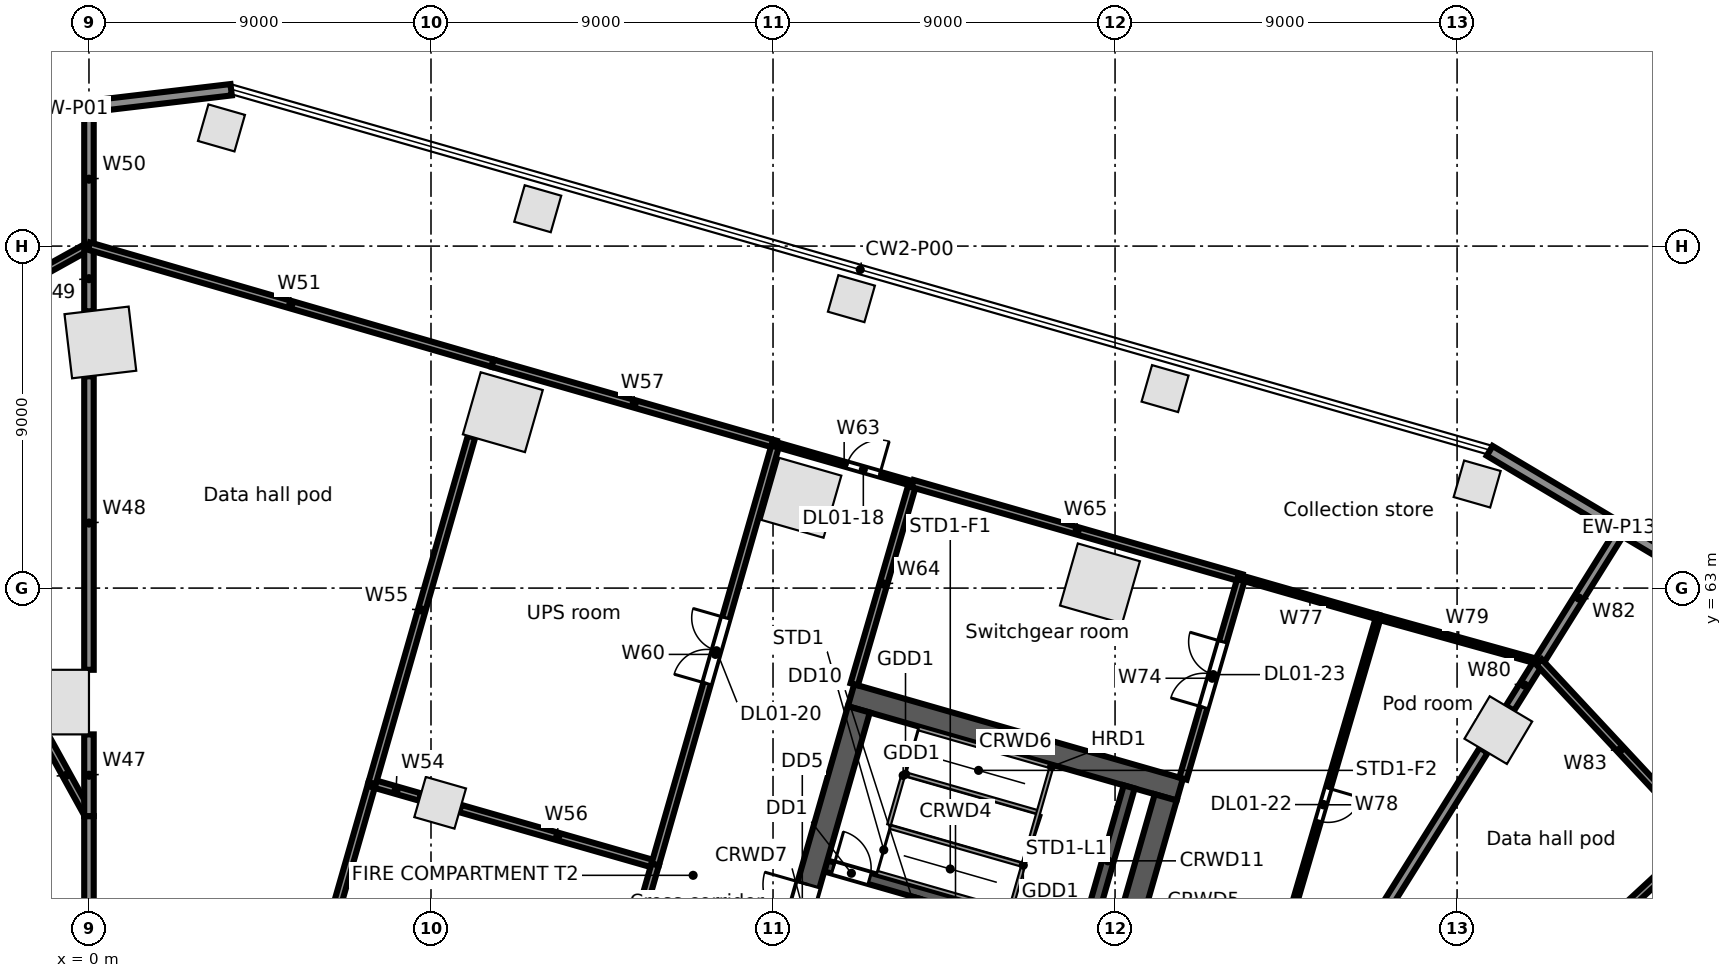
"""IFC4 building model, lengths in metres.
Left out: names, types, materials, properties, quantities, classifications, styles, units other than length and angle.
Written with IfcOpenShell. Run it as: python <this file> out.ifc"""

import sys

from ifc_helpers import new_model, si_unit, direction, frame, frame_2d, origin, origin_2d, place, context, subcontext, project, spatial, rectangle, extrude, element, fill, save


model = new_model("IFC4")
c1 = context("Model", 3, precision=1e-05, world=origin(), true_north=direction((0.0, 1.0)))
c2 = subcontext(c1, "Body", "Model", "MODEL_VIEW")
j1 = project(units=[si_unit("LENGTHUNIT", "METRE"), si_unit("PLANEANGLEUNIT", "RADIAN")], contexts=[c1])
p1 = place(None, origin())
s1 = spatial("IfcSite", under=j1, at=p1, CompositionType="ELEMENT")
p2 = place(p1, origin())
s2 = spatial("IfcBuilding", under=s1, at=p2, CompositionType="ELEMENT")
p3 = place(p2, frame((0.0, 0.0, 6.5)))
s3 = spatial("IfcBuildingStorey", under=s2, at=p3, CompositionType="ELEMENT", Elevation=6.5)
p4 = place(p3, frame((37.085, 59.262, 0.0), z_axis=(0.0, 0.0, 1.0), x_axis=(-0.859406411501, 0.511293086077, 0.0)))
e1 = element("IfcColumn", 1, at=p4, inside=s3, PredefinedType="COLUMN", context=c2, shape_type="SweptSolid", body=[
    extrude(rectangle(XDim=1.3, YDim=1.3, at=origin_2d()), origin(), (0.0, 0.0, 1.0), 5.0),
])
for number, where, z_axis, x_axis in (
    (2, (26.603, 63.124, 0.0), (0.0, 0.0, 1.0), (-0.961, 0.276, 0.0)),
    (3, (18.746, 65.376, 0.0), (0.0, 0.0, 1.0), (-0.961, 0.276, 0.0)),
    (4, (10.89, 67.629, 0.0), (0.0, 0.0, 1.0), (-0.961, 0.276, 0.0)),
    (5, (0.3, 69.464, 0.0), (0.0, 0.0, 1.0), (-0.993, -0.118, 0.0)),
    (6, (-0.85, 60.0, 0.0), (0.0, 0.0, 1.0), (0.0, 1.0, 0.0)),
):
    element("IfcColumn", number, at=place(p3, frame(where, z_axis=z_axis, x_axis=x_axis)), inside=s3, PredefinedType="COLUMN", context=c2, shape_type="SweptSolid", body=[
        extrude(rectangle(XDim=1.7, YDim=1.7, at=origin_2d()), origin(), (0.0, 0.0, 1.0), 5.0),
    ])
for number, where, z_axis, x_axis in (
    (7, (36.528, 65.739, 0.0), (0.0, 0.0, 1.0), (-0.961, 0.276, 0.0)),
    (8, (28.316, 68.25, 0.0), (0.0, 0.0, 1.0), (-0.961, 0.276, 0.0)),
    (9, (20.062, 70.616, 0.0), (0.0, 0.0, 1.0), (-0.961, 0.276, 0.0)),
    (10, (11.809, 72.983, 0.0), (0.0, 0.0, 1.0), (-0.961, 0.276, 0.0)),
    (11, (3.486, 75.11, 0.0), (0.0, 0.0, 1.0), (-0.961, 0.276, 0.0)),
):
    element("IfcColumn", number, at=place(p3, frame(where, z_axis=z_axis, x_axis=x_axis)), inside=s3, PredefinedType="COLUMN", context=c2, shape_type="SweptSolid", body=[
        extrude(rectangle(XDim=1.0, YDim=1.0, at=origin_2d()), origin(), (0.0, 0.0, 1.0), 5.0),
    ])
p5 = place(p3, frame((9.241, 57.35, 0.0), z_axis=(0.0, 0.0, 1.0), x_axis=(0.961261695938, -0.275637355817, 0.0)))
e12 = element("IfcColumn", 12, at=p5, inside=s3, PredefinedType="COLUMN", context=c2, shape_type="SweptSolid", body=[
    extrude(rectangle(XDim=1.1, YDim=1.1, at=origin_2d()), origin(), (0.0, 0.0, 1.0), 5.0),
])
p6 = place(p3, frame((-4.663, 75.12, 0.0), z_axis=(0.0, 0.0, 1.0), x_axis=(0.993069631717, 0.11752747152, 0.0)))
e13 = element("IfcWall", 13, at=p6, inside=s3, PredefinedType="STANDARD", context=c2, shape_type="SweptSolid", body=[
    extrude(rectangle(XDim=8.463, YDim=0.3, at=frame_2d((4.231, 0.0))), origin(), (0.0, 0.0, 1.0), 4.65),
])
p7 = place(p3, frame((36.858, 66.612, 0.0), z_axis=(0.0, 0.0, 1.0), x_axis=(0.85940790562, -0.51129057468, 0.0)))
e14 = element("IfcWall", 14, at=p7, inside=s3, PredefinedType="STANDARD", context=c2, shape_type="SweptSolid", body=[
    extrude(rectangle(XDim=7.906, YDim=0.3, at=frame_2d((3.953, 0.0))), origin(), (0.0, 0.0, 1.0), 4.65),
])
p8 = place(p3, frame((19.389, 55.689, 0.0), z_axis=(0.0, 0.0, 1.0), x_axis=(0.961261397636, -0.275638396117, 0.0)))
e15 = element("IfcWall", 15, at=p8, inside=s3, PredefinedType="SOLIDWALL", context=c2, shape_type="SweptSolid", body=[
    extrude(rectangle(XDim=7.1, YDim=0.3, at=frame_2d((3.55, 0.0))), origin(), (0.0, 0.0, 1.0), 4.65),
])
p9 = place(p8, frame((0.2, 0.0, 0.0)))
e16 = element("IfcOpeningElement", 16, at=p9, cuts=e15, PredefinedType="OPENING", context=c2, shape_type="SweptSolid", body=[
    extrude(rectangle(XDim=1.0, YDim=2.1, at=frame_2d((0.5, 1.05))), frame((0.0, 0.16, 0.0), z_axis=(0.0, -1.0, 0.0), x_axis=(1.0, 0.0, 0.0)), (0.0, 0.0, 1.0), 0.32),
])
p10 = place(p3, frame((20.053, 60.18, 0.0), z_axis=(0.0, 0.0, 1.0), x_axis=(0.96126248289, -0.275634611374, 0.0)))
e17 = element("IfcWall", 17, at=p10, inside=s3, PredefinedType="SOLIDWALL", context=c2, shape_type="SweptSolid", body=[
    extrude(rectangle(XDim=9.0, YDim=0.6, at=frame_2d((4.5, 0.0))), origin(), (0.0, 0.0, 1.0), 4.65),
])
p11 = place(p3, frame((17.282, 49.427, 0.0), z_axis=(0.0, 0.0, 1.0), x_axis=(0.275631631629, 0.961263337304, 0.0)))
e18 = element("IfcWall", 18, at=p11, inside=s3, PredefinedType="SOLIDWALL", context=c2, shape_type="SweptSolid", body=[
    extrude(rectangle(XDim=10.8, YDim=0.6, at=frame_2d((5.4, 0.0))), origin(), (0.0, 0.0, 1.0), 4.65),
])
p12 = place(p11, frame((4.8, 0.0, 0.0)))
e19 = element("IfcOpeningElement", 19, at=p12, cuts=e18, PredefinedType="OPENING", context=c2, shape_type="SweptSolid", body=[
    extrude(rectangle(XDim=1.2, YDim=2.1, at=frame_2d((0.6, 1.05))), frame((0.0, 0.31, 0.0), z_axis=(0.0, -1.0, 0.0), x_axis=(1.0, 0.0, 0.0)), (0.0, 0.0, 1.0), 0.62),
])
p13 = place(p3, frame((21.172, 52.837, 0.0), z_axis=(0.0, 0.0, 1.0), x_axis=(0.275657676022, 0.961255868981, 0.0)))
e20 = element("IfcWall", 20, at=p13, inside=s3, PredefinedType="PARTITIONING", context=c2, shape_type="SweptSolid", body=[
    extrude(rectangle(XDim=2.1, YDim=0.2, at=frame_2d((1.05, 0.0))), origin(), (0.0, 0.0, 1.0), 4.65),
])
p14 = place(p13, frame((0.55, 0.0, 0.0)))
e21 = element("IfcOpeningElement", 21, at=p14, cuts=e20, PredefinedType="OPENING", context=c2, shape_type="SweptSolid", body=[
    extrude(rectangle(XDim=1.0, YDim=2.1, at=frame_2d((0.5, 1.05))), frame((0.0, 0.11, 0.0), z_axis=(0.0, -1.0, 0.0), x_axis=(1.0, 0.0, 0.0)), (0.0, 0.0, 1.0), 0.22),
])
p15 = place(p3, frame((26.256, 53.876, 0.0), z_axis=(0.0, 0.0, 1.0), x_axis=(0.275612739511, 0.961268754209, 0.0)))
e22 = element("IfcWall", 22, at=p15, inside=s3, PredefinedType="SOLIDWALL", context=c2, shape_type="SweptSolid", body=[
    extrude(rectangle(XDim=4.05, YDim=0.3, at=frame_2d((2.025, 0.0))), origin(), (0.0, 0.0, 1.0), 4.65),
])
p16 = place(p3, frame((25.356, 47.112, 0.0), z_axis=(0.0, 0.0, 1.0), x_axis=(0.275631631629, 0.961263337304, 0.0)))
e23 = element("IfcWall", 23, at=p16, inside=s3, PredefinedType="SOLIDWALL", context=c2, shape_type="SweptSolid", body=[
    extrude(rectangle(XDim=10.8, YDim=0.6, at=frame_2d((5.4, 0.0))), origin(), (0.0, 0.0, 1.0), 4.65),
])
p17 = place(p16, frame((4.8, 0.0, 0.0)))
e24 = element("IfcOpeningElement", 24, at=p17, cuts=e23, PredefinedType="OPENING", context=c2, shape_type="SweptSolid", body=[
    extrude(rectangle(XDim=1.2, YDim=2.1, at=frame_2d((0.6, 1.05))), frame((0.0, 0.31, 0.0), z_axis=(0.0, -1.0, 0.0), x_axis=(1.0, 0.0, 0.0)), (0.0, 0.0, 1.0), 0.62),
])
p18 = place(p3, frame((-6.337, 68.478, 0.0), z_axis=(0.0, 0.0, 1.0), x_axis=(0.87407148623, 0.485797320864, 0.0)))
e25 = element("IfcWall", 25, at=p18, inside=s3, PredefinedType="PARTITIONING", context=c2, shape_type="SweptSolid", body=[
    extrude(rectangle(XDim=7.25, YDim=0.2, at=frame_2d((3.625, 0.0))), origin(), (0.0, 0.0, 1.0), 3.93),
])
p19 = place(p18, frame((2.7, 0.0, 0.0)))
e26 = element("IfcOpeningElement", 26, at=p19, cuts=e25, PredefinedType="OPENING", context=c2, shape_type="SweptSolid", body=[
    extrude(rectangle(XDim=1.8, YDim=2.1, at=frame_2d((0.9, 1.05))), frame((0.0, 0.11, 0.0), z_axis=(0.0, -1.0, 0.0), x_axis=(1.0, 0.0, 0.0)), (0.0, 0.0, 1.0), 0.22),
])
p20 = place(p3, frame((-1.187, 59.15, 0.0), z_axis=(0.0, 0.0, 1.0), x_axis=(0.483345381597, -0.875429747089, 0.0)))
e27 = element("IfcWall", 27, at=p20, inside=s3, PredefinedType="PARTITIONING", context=c2, shape_type="SweptSolid", body=[
    extrude(rectangle(XDim=2.456, YDim=0.2, at=frame_2d((1.228, 0.0))), origin(), (0.0, 0.0, 1.0), 4.65),
])
p21 = place(p3, frame((0.0, 49.726, 0.0), z_axis=(0.0, 0.0, 1.0), x_axis=(0.0, 1.0, 0.0)))
e28 = element("IfcWall", 28, at=p21, inside=s3, PredefinedType="PARTITIONING", context=c2, shape_type="SweptSolid", body=[
    extrude(rectangle(XDim=7.274, YDim=0.25, at=frame_2d((3.637, 0.0))), origin(), (0.0, 0.0, 1.0), 4.65),
])
p22 = place(p3, frame((0.0, 57.0, 0.0), z_axis=(0.0, 0.0, 1.0), x_axis=(0.0, 1.0, 0.0)))
e29 = element("IfcWall", 29, at=p22, inside=s3, PredefinedType="PARTITIONING", context=c2, shape_type="SweptSolid", body=[
    extrude(rectangle(XDim=2.15, YDim=0.25, at=frame_2d((1.075, 0.0))), origin(), (0.0, 0.0, 1.0), 4.65),
])
p23 = place(p3, frame((0.0, 60.85, 0.0), z_axis=(0.0, 0.0, 1.0), x_axis=(0.0, 1.0, 0.0)))
e30 = element("IfcWall", 30, at=p23, inside=s3, PredefinedType="PARTITIONING", context=c2, shape_type="SweptSolid", body=[
    extrude(rectangle(XDim=7.723, YDim=0.25, at=frame_2d((3.861, 0.0))), origin(), (0.0, 0.0, 1.0), 3.93),
])
p24 = place(p3, frame((0.0, 70.285, 0.0), z_axis=(0.0, 0.0, 1.0), x_axis=(0.0, 1.0, 0.0)))
e31 = element("IfcWall", 31, at=p24, inside=s3, PredefinedType="PARTITIONING", context=c2, shape_type="SweptSolid", body=[
    extrude(rectangle(XDim=1.715, YDim=0.25, at=frame_2d((0.857, 0.0))), origin(), (0.0, 0.0, 1.0), 4.65),
])
p25 = place(p3, frame((0.0, 72.0, 0.0), z_axis=(0.0, 0.0, 1.0), x_axis=(0.0, 1.0, 0.0)))
e32 = element("IfcWall", 32, at=p25, inside=s3, PredefinedType="PARTITIONING", context=c2, shape_type="SweptSolid", body=[
    extrude(rectangle(XDim=3.521, YDim=0.25, at=frame_2d((1.76, 0.0))), origin(), (0.0, 0.0, 1.0), 4.024),
])
p26 = place(p3, frame((0.0, 72.0, 0.0), z_axis=(0.0, 0.0, 1.0), x_axis=(0.960375968852, -0.278707729443, 0.0)))
e33 = element("IfcWall", 33, at=p26, inside=s3, PredefinedType="PARTITIONING", context=c2, shape_type="SweptSolid", body=[
    extrude(rectangle(XDim=11.058, YDim=0.2, at=frame_2d((5.529, 0.0))), origin(), (0.0, 0.0, 1.0), 3.712),
])
p27 = place(p3, frame((4.28, 46.809, 0.0), z_axis=(0.0, 0.0, 1.0), x_axis=(0.275635044812, 0.961262358605, 0.0)))
e34 = element("IfcWall", 34, at=p27, inside=s3, PredefinedType="PARTITIONING", context=c2, shape_type="SweptSolid", body=[
    extrude(rectangle(XDim=11.5, YDim=0.2, at=frame_2d((5.75, 0.0))), origin(), (0.0, 0.0, 1.0), 3.712),
])
p28 = place(p3, frame((7.45, 57.864, 0.0), z_axis=(0.0, 0.0, 1.0), x_axis=(0.961221622993, -0.275777068465, 0.0)))
e35 = element("IfcWall", 35, at=p28, inside=s3, PredefinedType="PARTITIONING", context=c2, shape_type="SweptSolid", body=[
    extrude(rectangle(XDim=1.313, YDim=0.2, at=frame_2d((0.656, 0.0))), origin(), (0.0, 0.0, 1.0), 3.712),
])
p29 = place(p3, frame((7.45, 57.864, 0.0), z_axis=(0.0, 0.0, 1.0), x_axis=(0.275710305557, 0.961240774941, 0.0)))
e36 = element("IfcWall", 36, at=p29, inside=s3, PredefinedType="PARTITIONING", context=c2, shape_type="SweptSolid", body=[
    extrude(rectangle(XDim=9.485, YDim=0.2, at=frame_2d((4.742, 0.0))), origin(), (0.0, 0.0, 1.0), 3.712),
])
p30 = place(p3, frame((9.77, 57.199, 0.0), z_axis=(0.0, 0.0, 1.0), x_axis=(0.961262835898, -0.275633380273, 0.0)))
e37 = element("IfcWall", 37, at=p30, inside=s3, PredefinedType="PARTITIONING", context=c2, shape_type="SweptSolid", body=[
    extrude(rectangle(XDim=5.337, YDim=0.2, at=frame_2d((2.668, 0.0))), origin(), (0.0, 0.0, 1.0), 3.712),
])
p31 = place(p3, frame((10.62, 68.918, 0.0), z_axis=(0.0, 0.0, 1.0), x_axis=(0.961260764876, -0.275640602796, 0.0)))
e38 = element("IfcWall", 38, at=p31, inside=s3, PredefinedType="PARTITIONING", context=c2, shape_type="SweptSolid", body=[
    extrude(rectangle(XDim=7.749, YDim=0.2, at=frame_2d((3.875, 0.0))), origin(), (0.0, 0.0, 1.0), 3.712),
])
p32 = place(p3, frame((11.73, 44.673, 0.0), z_axis=(0.0, 0.0, 1.0), x_axis=(0.275635044812, 0.961262358605, 0.0)))
e39 = element("IfcWall", 39, at=p32, inside=s3, PredefinedType="PARTITIONING", context=c2, shape_type="SweptSolid", body=[
    extrude(rectangle(XDim=11.5, YDim=0.2, at=frame_2d((5.75, 0.0))), origin(), (0.0, 0.0, 1.0), 3.712),
])
p33 = place(p32, frame((4.95, 0.0, 0.0)))
e40 = element("IfcOpeningElement", 40, at=p33, cuts=e39, PredefinedType="OPENING", context=c2, shape_type="SweptSolid", body=[
    extrude(rectangle(XDim=1.8, YDim=2.1, at=frame_2d((0.9, 1.05))), frame((0.0, 0.11, 0.0), z_axis=(0.0, -1.0, 0.0), x_axis=(1.0, 0.0, 0.0)), (0.0, 0.0, 1.0), 0.22),
])
p34 = place(p3, frame((14.9, 55.728, 0.0), z_axis=(0.0, 0.0, 1.0), x_axis=(0.27559869205, 0.961272781754, 0.0)))
e41 = element("IfcWall", 41, at=p34, inside=s3, PredefinedType="PARTITIONING", context=c2, shape_type="SweptSolid", body=[
    extrude(rectangle(XDim=11.499, YDim=0.2, at=frame_2d((5.75, 0.0))), origin(), (0.0, 0.0, 1.0), 3.712),
])
p35 = place(p34, frame((4.95, 0.0, 0.0)))
e42 = element("IfcOpeningElement", 42, at=p35, cuts=e41, PredefinedType="OPENING", context=c2, shape_type="SweptSolid", body=[
    extrude(rectangle(XDim=1.8, YDim=2.1, at=frame_2d((0.9, 1.05))), frame((0.0, 0.11, 0.0), z_axis=(0.0, -1.0, 0.0), x_axis=(1.0, 0.0, 0.0)), (0.0, 0.0, 1.0), 0.22),
])
p36 = place(p3, frame((18.069, 66.782, 0.0), z_axis=(0.0, 0.0, 1.0), x_axis=(0.961314848061, -0.275451924837, 0.0)))
e43 = element("IfcWall", 43, at=p36, inside=s3, PredefinedType="PARTITIONING", context=c2, shape_type="SweptSolid", body=[
    extrude(rectangle(XDim=3.75, YDim=0.125, at=frame_2d((1.875, 0.0))), origin(), (0.0, 0.0, 1.0), 3.712),
])
p37 = place(p36, frame((1.95, 0.0, 0.0)))
e44 = element("IfcOpeningElement", 44, at=p37, cuts=e43, PredefinedType="OPENING", context=c2, shape_type="SweptSolid", body=[
    extrude(rectangle(XDim=0.9, YDim=2.1, at=frame_2d((0.45, 1.05))), frame((0.0, 0.073, 0.0), z_axis=(0.0, -1.0, 0.0), x_axis=(1.0, 0.0, 0.0)), (0.0, 0.0, 1.0), 0.145),
])
p38 = place(p3, frame((20.136, 60.468, 0.0), z_axis=(0.0, 0.0, 1.0), x_axis=(0.279630121779, 0.96010780384, 0.0)))
e45 = element("IfcWall", 45, at=p38, inside=s3, PredefinedType="PARTITIONING", context=c2, shape_type="SweptSolid", body=[
    extrude(rectangle(XDim=5.5, YDim=0.2, at=frame_2d((2.75, 0.0))), origin(), (0.0, 0.0, 1.0), 4.018),
])
p39 = place(p3, frame((21.674, 65.749, 0.0), z_axis=(0.0, 0.0, 1.0), x_axis=(0.961259417468, -0.275645301662, 0.0)))
e46 = element("IfcWall", 46, at=p39, inside=s3, PredefinedType="PARTITIONING", context=c2, shape_type="SweptSolid", body=[
    extrude(rectangle(XDim=9.0, YDim=0.2, at=frame_2d((4.5, 0.0))), origin(), (0.0, 0.0, 1.0), 3.822),
])
p40 = place(p3, frame((26.356, 41.557, 0.0), z_axis=(0.0, 0.0, 1.0), x_axis=(0.734047402287, 0.679098233834, 0.0)))
e47 = element("IfcWall", 47, at=p40, inside=s3, PredefinedType="PARTITIONING", context=c2, shape_type="SweptSolid", body=[
    extrude(rectangle(XDim=21.926, YDim=0.2, at=frame_2d((10.963, 0.0))), origin(), (0.0, 0.0, 1.0), 3.73),
])
p41 = place(p40, frame((9.95, 0.0, 0.0)))
e48 = element("IfcOpeningElement", 48, at=p41, cuts=e47, PredefinedType="OPENING", context=c2, shape_type="SweptSolid", body=[
    extrude(rectangle(XDim=1.8, YDim=2.1, at=frame_2d((0.9, 1.05))), frame((0.0, 0.11, 0.0), z_axis=(0.0, -1.0, 0.0), x_axis=(1.0, 0.0, 0.0)), (0.0, 0.0, 1.0), 0.22),
])
p42 = place(p3, frame((28.787, 57.987, 0.0), z_axis=(0.0, 0.0, 1.0), x_axis=(0.279752860161, 0.960072047938, 0.0)))
e49 = element("IfcWall", 49, at=p42, inside=s3, PredefinedType="PARTITIONING", context=c2, shape_type="SweptSolid", body=[
    extrude(rectangle(XDim=5.501, YDim=0.2, at=frame_2d((2.75, 0.0))), origin(), (0.0, 0.0, 1.0), 3.922),
])
p43 = place(p42, frame((1.95, 0.0, 0.0)))
e50 = element("IfcOpeningElement", 50, at=p43, cuts=e49, PredefinedType="OPENING", context=c2, shape_type="SweptSolid", body=[
    extrude(rectangle(XDim=1.8, YDim=2.1, at=frame_2d((0.9, 1.05))), frame((0.0, 0.11, 0.0), z_axis=(0.0, -1.0, 0.0), x_axis=(1.0, 0.0, 0.0)), (0.0, 0.0, 1.0), 0.22),
])
p44 = place(p3, frame((29.543, 47.279, 0.0), z_axis=(0.0, 0.0, 1.0), x_axis=(0.529929076845, 0.848041964477, 0.0)))
e51 = element("IfcWall", 51, at=p44, inside=s3, PredefinedType="PARTITIONING", context=c2, shape_type="SweptSolid", body=[
    extrude(rectangle(XDim=13.507, YDim=0.25, at=frame_2d((6.754, 0.0))), origin(), (0.0, 0.0, 1.0), 3.73),
])
p45 = place(p3, frame((30.326, 63.268, 0.0), z_axis=(0.0, 0.0, 1.0), x_axis=(0.96120880595, -0.275821738383, 0.0)))
e52 = element("IfcWall", 52, at=p45, inside=s3, PredefinedType="PARTITIONING", context=c2, shape_type="SweptSolid", body=[
    extrude(rectangle(XDim=3.75, YDim=0.125, at=frame_2d((1.875, 0.0))), origin(), (0.0, 0.0, 1.0), 4.65),
])
p46 = place(p3, frame((31.034, 52.361, 0.0), z_axis=(0.0, 0.0, 1.0), x_axis=(0.281471237406, 0.959569665273, 0.0)))
e53 = element("IfcWall", 53, at=p46, inside=s3, PredefinedType="PARTITIONING", context=c2, shape_type="SweptSolid", body=[
    extrude(rectangle(XDim=10.289, YDim=0.125, at=frame_2d((5.145, 0.0))), origin(), (0.0, 0.0, 1.0), 3.922),
])
p47 = place(p46, frame((4.7, 0.0, 0.0)))
e54 = element("IfcOpeningElement", 54, at=p47, cuts=e53, PredefinedType="OPENING", context=c2, shape_type="SweptSolid", body=[
    extrude(rectangle(XDim=0.9, YDim=2.1, at=frame_2d((0.45, 1.05))), frame((0.0, 0.073, 0.0), z_axis=(0.0, -1.0, 0.0), x_axis=(1.0, 0.0, 0.0)), (0.0, 0.0, 1.0), 0.145),
])
p48 = place(p3, frame((33.93, 62.234, 0.0), z_axis=(0.0, 0.0, 1.0), x_axis=(0.963433299433, -0.267948274007, 0.0)))
e55 = element("IfcWall", 55, at=p48, inside=s3, PredefinedType="PARTITIONING", context=c2, shape_type="SweptSolid", body=[
    extrude(rectangle(XDim=4.385, YDim=0.125, at=frame_2d((2.192, 0.0))), origin(), (0.0, 0.0, 1.0), 4.018),
])
p49 = place(p3, frame((37.39, 59.837, 0.0), z_axis=(0.0, 0.0, 1.0), x_axis=(0.530151180786, 0.84790313451, 0.0)))
e56 = element("IfcWall", 56, at=p49, inside=s3, PredefinedType="PARTITIONING", context=c2, shape_type="SweptSolid", body=[
    extrude(rectangle(XDim=1.441, YDim=0.25, at=frame_2d((0.721, 0.0))), origin(), (0.0, 0.0, 1.0), 4.65),
])
p50 = place(p3, frame((38.154, 61.059, 0.0), z_axis=(0.0, 0.0, 1.0), x_axis=(0.529921368013, 0.848046781565, 0.0)))
e57 = element("IfcWall", 57, at=p50, inside=s3, PredefinedType="PARTITIONING", context=c2, shape_type="SweptSolid", body=[
    extrude(rectangle(XDim=3.961, YDim=0.25, at=frame_2d((1.98, 0.0))), origin(), (0.0, 0.0, 1.0), 4.024),
])
p51 = place(p3, frame((38.154, 61.059, 0.0), z_axis=(0.0, 0.0, 1.0), x_axis=(0.681663875787, -0.731665470312, 0.0)))
e58 = element("IfcWall", 58, at=p51, inside=s3, PredefinedType="PARTITIONING", context=c2, shape_type="SweptSolid", body=[
    extrude(rectangle(XDim=6.303, YDim=0.2, at=frame_2d((3.152, 0.0))), origin(), (0.0, 0.0, 1.0), 4.018),
])
p52 = place(p9, origin())
e59 = element("IfcDoor", 59, at=p52, inside=s3, OperationType="SINGLE_SWING_LEFT", PredefinedType="DOOR", context=c2, shape_type="SweptSolid", body=[
    extrude(rectangle(XDim=1.0, YDim=2.1, at=frame_2d((0.5, 1.05))), frame((0.0, 0.025, 0.0), z_axis=(0.0, -1.0, 0.0), x_axis=(1.0, 0.0, 0.0)), (0.0, 0.0, 1.0), 0.05),
])
fill(e16, e59)
p53 = place(p12, origin())
e60 = element("IfcDoor", 60, at=p53, inside=s3, OperationType="SINGLE_SWING_RIGHT", PredefinedType="DOOR", context=c2, shape_type="SweptSolid", body=[
    extrude(rectangle(XDim=1.2, YDim=2.1, at=frame_2d((0.6, 1.05))), frame((0.0, 0.025, 0.0), z_axis=(0.0, -1.0, 0.0), x_axis=(1.0, 0.0, 0.0)), (0.0, 0.0, 1.0), 0.05),
])
fill(e19, e60)
p54 = place(p37, origin())
e61 = element("IfcDoor", 61, at=p54, inside=s3, OperationType="SINGLE_SWING_RIGHT", PredefinedType="DOOR", context=c2, shape_type="SweptSolid", body=[
    extrude(rectangle(XDim=0.9, YDim=2.1, at=frame_2d((0.45, 1.05))), frame((0.0, 0.025, 0.0), z_axis=(0.0, -1.0, 0.0), x_axis=(1.0, 0.0, 0.0)), (0.0, 0.0, 1.0), 0.05),
])
fill(e44, e61)
p55 = place(p35, origin())
e62 = element("IfcDoor", 62, at=p55, inside=s3, OperationType="DOUBLE_DOOR_SINGLE_SWING", PredefinedType="DOOR", context=c2, shape_type="SweptSolid", body=[
    extrude(rectangle(XDim=1.8, YDim=2.1, at=frame_2d((0.9, 1.05))), frame((0.0, 0.025, 0.0), z_axis=(0.0, -1.0, 0.0), x_axis=(1.0, 0.0, 0.0)), (0.0, 0.0, 1.0), 0.05),
])
fill(e42, e62)
p56 = place(p47, frame((0.9, 0.0, 0.0), z_axis=(0.0, 0.0, 1.0), x_axis=(-1.0, 0.0, 0.0)))
e63 = element("IfcDoor", 63, at=p56, inside=s3, OperationType="SINGLE_SWING_LEFT", PredefinedType="DOOR", context=c2, shape_type="SweptSolid", body=[
    extrude(rectangle(XDim=0.9, YDim=2.1, at=frame_2d((0.45, 1.05))), frame((0.0, 0.025, 0.0), z_axis=(0.0, -1.0, 0.0), x_axis=(1.0, 0.0, 0.0)), (0.0, 0.0, 1.0), 0.05),
])
fill(e54, e63)
p57 = place(p43, origin())
e64 = element("IfcDoor", 64, at=p57, inside=s3, OperationType="DOUBLE_DOOR_SINGLE_SWING", PredefinedType="DOOR", context=c2, shape_type="SweptSolid", body=[
    extrude(rectangle(XDim=1.8, YDim=2.1, at=frame_2d((0.9, 1.05))), frame((0.0, 0.025, 0.0), z_axis=(0.0, -1.0, 0.0), x_axis=(1.0, 0.0, 0.0)), (0.0, 0.0, 1.0), 0.05),
])
fill(e50, e64)
save(model, sys.argv[1])
